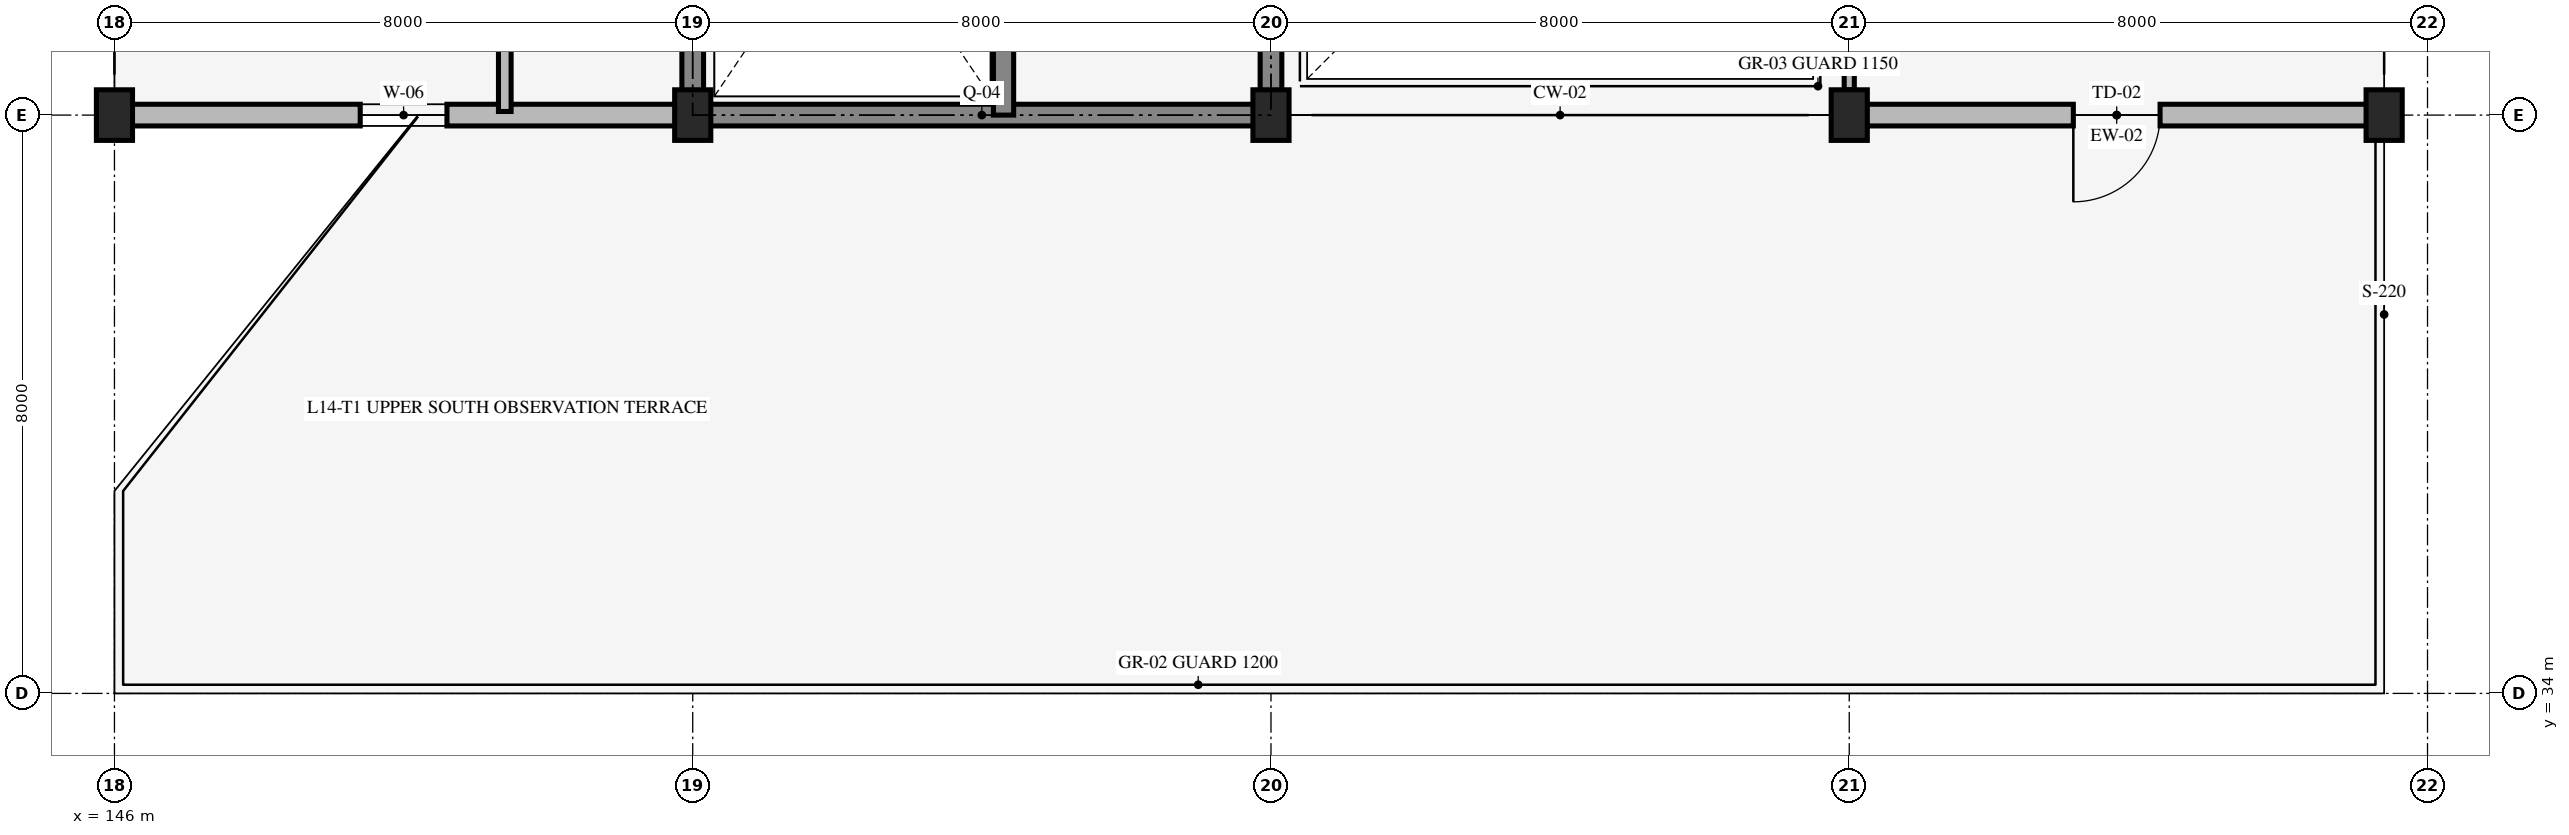
"""IFC4 building model, lengths in metres.
Left out: names, types, materials, properties, quantities, classifications, styles, units other than length and angle.
Written with IfcOpenShell. Run it as: python <this file> out.ifc"""

import sys

from ifc_helpers import new_model, si_unit, direction, frame, frame_2d, origin, origin_2d, place, context, subcontext, project, spatial, rectangle, extrude, element, fill, save


model = new_model("IFC4")
c1 = context("Model", 3, precision=1e-05, world=origin(), true_north=direction((0.0, 1.0)))
c2 = subcontext(c1, "Body", "Model", "MODEL_VIEW")
j1 = project(units=[si_unit("LENGTHUNIT", "METRE"), si_unit("PLANEANGLEUNIT", "RADIAN")], contexts=[c1])
p1 = place(None, origin())
s1 = spatial("IfcSite", under=j1, at=p1, CompositionType="ELEMENT")
p2 = place(p1, origin())
s2 = spatial("IfcBuilding", under=s1, at=p2, CompositionType="ELEMENT")
p3 = place(p2, frame((0.0, 0.0, 57.0)))
s3 = spatial("IfcBuildingStorey", under=s2, at=p3, CompositionType="ELEMENT", Elevation=57.0)
p4 = place(p3, frame((154.0, 42.0, 0.0), z_axis=(0.0, 0.0, 1.0), x_axis=(1.0, 0.0, 0.0)))
e1 = element("IfcWall", 1, at=p4, inside=s3, PredefinedType="SHEAR", context=c2, shape_type="SweptSolid", body=[
    extrude(rectangle(XDim=8.0, YDim=0.3, at=frame_2d((4.0, 0.0))), origin(), (0.0, 0.0, 1.0), 3.95),
])
p5 = place(p3, frame((162.0, 42.0, 0.0), z_axis=(0.0, 0.0, 1.0), x_axis=(0.0, 1.0, 0.0)))
e2 = element("IfcWall", 2, at=p5, inside=s3, PredefinedType="SHEAR", context=c2, shape_type="SweptSolid", body=[
    extrude(rectangle(XDim=8.0, YDim=0.3, at=frame_2d((4.0, 0.0))), origin(), (0.0, 0.0, 1.0), 3.95),
])
p6 = place(p5, frame((3.175, 0.0, 0.0)))
e3 = element("IfcOpeningElement", 3, at=p6, cuts=e2, PredefinedType="OPENING", context=c2, shape_type="SweptSolid", body=[
    extrude(rectangle(XDim=1.05, YDim=2.2, at=frame_2d((0.525, 1.1))), frame((0.0, 0.16, 0.0), z_axis=(0.0, -1.0, 0.0), x_axis=(1.0, 0.0, 0.0)), (0.0, 0.0, 1.0), 0.32),
])
p7 = place(p3, frame((154.0, 50.0, 0.0), z_axis=(0.0, 0.0, 1.0), x_axis=(0.0, -1.0, 0.0)))
e4 = element("IfcWall", 4, at=p7, inside=s3, PredefinedType="SHEAR", context=c2, shape_type="SweptSolid", body=[
    extrude(rectangle(XDim=8.0, YDim=0.3, at=frame_2d((4.0, 0.0))), origin(), (0.0, 0.0, 1.0), 3.95),
])
p8 = place(p3, frame((158.3, 42.0, 0.0), z_axis=(0.0, 0.0, 1.0), x_axis=(0.0, 1.0, 0.0)))
e5 = element("IfcWall", 5, at=p8, inside=s3, PredefinedType="SHEAR", context=c2, shape_type="SweptSolid", body=[
    extrude(rectangle(XDim=8.0, YDim=0.28, at=frame_2d((4.0, 0.0))), origin(), (0.0, 0.0, 1.0), 3.95),
])
for number, where, z_axis, x_axis in (
    (6, (146.0, 42.0, 0.0), (0.0, 0.0, 1.0), (1.0, 0.0, 0.0)),
    (7, (154.0, 42.0, 0.0), (0.0, 0.0, 1.0), (1.0, 0.0, 0.0)),
    (8, (162.0, 42.0, 0.0), (0.0, 0.0, 1.0), (1.0, 0.0, 0.0)),
    (9, (170.0, 42.0, 0.0), (0.0, 0.0, 1.0), (1.0, 0.0, 0.0)),
    (10, (177.4, 42.0, 0.0), (0.0, 0.0, 1.0), (1.0, 0.0, 0.0)),
):
    element("IfcColumn", number, at=place(p3, frame(where, z_axis=z_axis, x_axis=x_axis)), inside=s3, PredefinedType="COLUMN", context=c2, shape_type="SweptSolid", body=[
        extrude(rectangle(XDim=0.5, YDim=0.7, at=origin_2d()), origin(), (0.0, 0.0, 1.0), 4.2),
    ])
p9 = place(p3, frame((177.4, 42.0, 0.0), z_axis=(0.0, 0.0, 1.0), x_axis=(-1.0, 0.0, 0.0)))
e11 = element("IfcWall", 11, at=p9, inside=s3, PredefinedType="STANDARD", context=c2, shape_type="SweptSolid", body=[
    extrude(rectangle(XDim=7.4, YDim=0.3, at=frame_2d((3.7, 0.0))), origin(), (0.0, 0.0, 1.0), 3.29),
])
p10 = place(p9, frame((3.1, 0.0, 0.0)))
e12 = element("IfcOpeningElement", 12, at=p10, cuts=e11, PredefinedType="OPENING", context=c2, shape_type="SweptSolid", body=[
    extrude(rectangle(XDim=1.2, YDim=2.2, at=frame_2d((0.6, 1.1))), frame((0.0, 0.16, 0.0), z_axis=(0.0, -1.0, 0.0), x_axis=(1.0, 0.0, 0.0)), (0.0, 0.0, 1.0), 0.32),
])
p11 = place(p3, frame((154.0, 42.0, 0.0), z_axis=(0.0, 0.0, 1.0), x_axis=(-1.0, 0.0, 0.0)))
e13 = element("IfcWall", 13, at=p11, inside=s3, PredefinedType="STANDARD", context=c2, shape_type="SweptSolid", body=[
    extrude(rectangle(XDim=8.0, YDim=0.3, at=frame_2d((4.0, 0.0))), origin(), (0.0, 0.0, 1.0), 3.34),
])
p12 = place(p11, frame((3.4, 0.0, 0.85)))
e14 = element("IfcOpeningElement", 14, at=p12, cuts=e13, PredefinedType="OPENING", context=c2, shape_type="SweptSolid", body=[
    extrude(rectangle(XDim=1.2, YDim=1.2, at=frame_2d((0.6, 0.6))), frame((0.0, 0.16, 0.0), z_axis=(0.0, -1.0, 0.0), x_axis=(1.0, 0.0, 0.0)), (0.0, 0.0, 1.0), 0.32),
])
p13 = place(p3, frame((151.4, 42.05, 0.0), z_axis=(0.0, 0.0, 1.0), x_axis=(0.0, 1.0, 0.0)))
e15 = element("IfcWall", 15, at=p13, inside=s3, PredefinedType="STANDARD", context=c2, shape_type="SweptSolid", body=[
    extrude(rectangle(XDim=7.83, YDim=0.175, at=frame_2d((3.915, 0.0))), origin(), (0.0, 0.0, 1.0), 3.9),
])
p14 = place(p13, frame((3.065, 0.0, 0.0)))
e16 = element("IfcOpeningElement", 16, at=p14, cuts=e15, PredefinedType="OPENING", context=c2, shape_type="SweptSolid", body=[
    extrude(rectangle(XDim=1.7, YDim=2.3, at=frame_2d((0.85, 1.15))), frame((0.0, 0.098, 0.0), z_axis=(0.0, -1.0, 0.0), x_axis=(1.0, 0.0, 0.0)), (0.0, 0.0, 1.0), 0.195),
])
p15 = place(p3, frame((170.0, 42.35, 0.0), z_axis=(0.0, 0.0, 1.0), x_axis=(0.0, 1.0, 0.0)))
e17 = element("IfcWall", 17, at=p15, inside=s3, PredefinedType="STANDARD", context=c2, shape_type="SweptSolid", body=[
    extrude(rectangle(XDim=7.65, YDim=0.14, at=frame_2d((3.825, 0.0))), origin(), (0.0, 0.0, 1.0), 3.34),
])
p16 = place(p10, origin())
e18 = element("IfcDoor", 18, at=p16, inside=s3, OperationType="SINGLE_SWING_RIGHT", PredefinedType="DOOR", context=c2, shape_type="SweptSolid", body=[
    extrude(rectangle(XDim=1.2, YDim=2.2, at=frame_2d((0.6, 1.1))), frame((0.0, 0.025, 0.0), z_axis=(0.0, -1.0, 0.0), x_axis=(1.0, 0.0, 0.0)), (0.0, 0.0, 1.0), 0.05),
])
fill(e12, e18)
p17 = place(p12, origin())
e19 = element("IfcWindow", 19, at=p17, inside=s3, PartitioningType="SINGLE_PANEL", PredefinedType="WINDOW", context=c2, shape_type="SweptSolid", body=[
    extrude(rectangle(XDim=1.2, YDim=1.2, at=frame_2d((0.6, 0.6))), frame((0.0, 0.03, 0.0), z_axis=(0.0, -1.0, 0.0), x_axis=(1.0, 0.0, 0.0)), (0.0, 0.0, 1.0), 0.06),
])
fill(e14, e19)
save(model, sys.argv[1])
